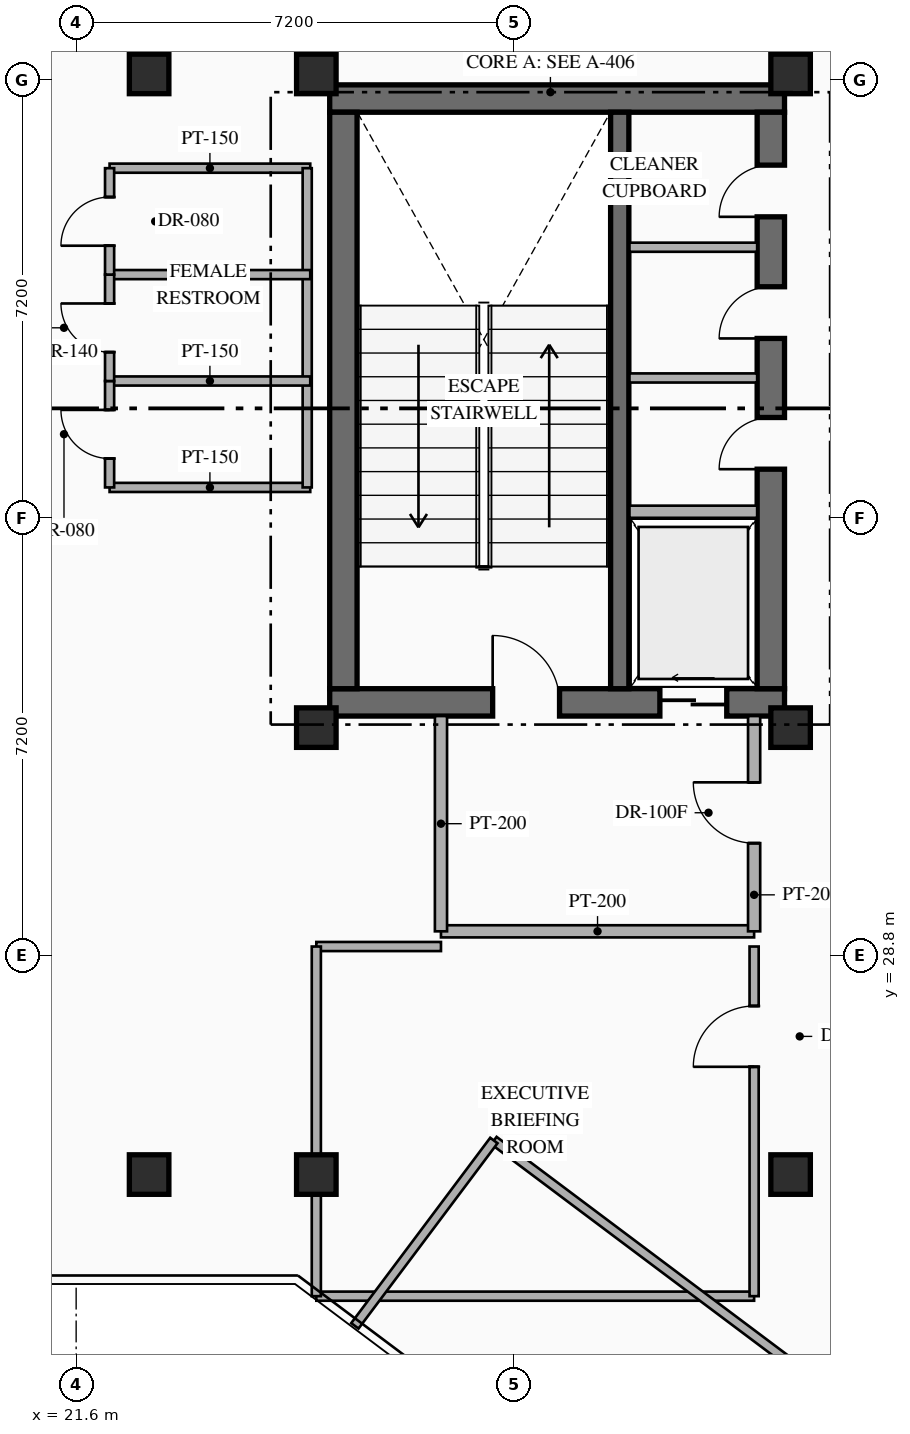
"""IFC4 building model, lengths in metres.
Left out: names, types, materials, properties, quantities, classifications, styles, units other than length and angle.
Written with IfcOpenShell. Run it as: python <this file> out.ifc"""

import sys

from ifc_helpers import new_model, si_unit, direction, frame, frame_2d, origin, origin_2d, place, context, subcontext, project, spatial, rectangle, hollow_rectangle, extrude, element, fill, save


model = new_model("IFC4")
c1 = context("Model", 3, precision=1e-05, world=origin(), true_north=direction((0.0, 1.0)))
c2 = subcontext(c1, "Body", "Model", "MODEL_VIEW")
j1 = project(units=[si_unit("LENGTHUNIT", "METRE"), si_unit("PLANEANGLEUNIT", "RADIAN")], contexts=[c1])
p1 = place(None, origin())
s1 = spatial("IfcSite", under=j1, at=p1, CompositionType="ELEMENT")
p2 = place(p1, origin())
s2 = spatial("IfcBuilding", under=s1, at=p2, CompositionType="ELEMENT")
p3 = place(p2, frame((0.0, 0.0, 261.75)))
s3 = spatial("IfcBuildingStorey", under=s2, at=p3, CompositionType="ELEMENT", Elevation=261.75)
p4 = place(p3, frame((25.77, 32.965, 0.0), z_axis=(0.0, 0.0, 1.0), x_axis=(1.0, 0.0, 0.0)))
e1 = element("IfcWall", 1, at=p4, inside=s3, PredefinedType="SHEAR", context=c2, shape_type="SweptSolid", body=[
    extrude(rectangle(XDim=7.48, YDim=0.45, at=frame_2d((3.74, 0.0))), origin(), (0.0, 0.0, 1.0), 4.2),
])
p5 = place(p4, frame((2.68, 0.0, 0.0)))
e2 = element("IfcOpeningElement", 2, at=p5, cuts=e1, PredefinedType="OPENING", context=c2, shape_type="SweptSolid", body=[
    extrude(rectangle(XDim=1.1, YDim=2.2, at=frame_2d((0.55, 1.1))), frame((0.0, 0.235, 0.0), z_axis=(0.0, -1.0, 0.0), x_axis=(1.0, 0.0, 0.0)), (0.0, 0.0, 1.0), 0.47),
])
p6 = place(p4, frame((5.43, 0.0, 0.0)))
e3 = element("IfcOpeningElement", 3, at=p6, cuts=e1, PredefinedType="OPENING", context=c2, shape_type="SweptSolid", body=[
    extrude(rectangle(XDim=1.1, YDim=2.15, at=frame_2d((0.55, 1.075))), frame((0.0, 0.235, 0.0), z_axis=(0.0, -1.0, 0.0), x_axis=(1.0, 0.0, 0.0)), (0.0, 0.0, 1.0), 0.47),
])
p7 = place(p3, frame((25.77, 42.895, 0.0), z_axis=(0.0, 0.0, 1.0), x_axis=(1.0, 0.0, 0.0)))
e4 = element("IfcWall", 4, at=p7, inside=s3, PredefinedType="SHEAR", context=c2, shape_type="SweptSolid", body=[
    extrude(rectangle(XDim=7.48, YDim=0.45, at=frame_2d((3.74, 0.0))), origin(), (0.0, 0.0, 1.0), 4.2),
])
p8 = place(p3, frame((25.995, 33.19, 0.0), z_axis=(0.0, 0.0, 1.0), x_axis=(0.0, 1.0, 0.0)))
e5 = element("IfcWall", 5, at=p8, inside=s3, PredefinedType="SHEAR", context=c2, shape_type="SweptSolid", body=[
    extrude(rectangle(XDim=9.48, YDim=0.45, at=frame_2d((4.74, 0.0))), origin(), (0.0, 0.0, 1.0), 4.2),
])
p9 = place(p3, frame((33.025, 33.19, 0.0), z_axis=(0.0, 0.0, 1.0), x_axis=(0.0, 1.0, 0.0)))
e6 = element("IfcWall", 6, at=p9, inside=s3, PredefinedType="SHEAR", context=c2, shape_type="SweptSolid", body=[
    extrude(rectangle(XDim=9.48, YDim=0.45, at=frame_2d((4.74, 0.0))), origin(), (0.0, 0.0, 1.0), 4.2),
])
p10 = place(p9, frame((3.61, 0.0, 0.0)))
e7 = element("IfcOpeningElement", 7, at=p10, cuts=e6, PredefinedType="OPENING", context=c2, shape_type="SweptSolid", body=[
    extrude(rectangle(XDim=0.85, YDim=2.08, at=frame_2d((0.425, 1.04))), frame((0.0, 0.235, 0.0), z_axis=(0.0, -1.0, 0.0), x_axis=(1.0, 0.0, 0.0)), (0.0, 0.0, 1.0), 0.47),
])
p11 = place(p9, frame((5.76, 0.0, 0.0)))
e8 = element("IfcOpeningElement", 8, at=p11, cuts=e6, PredefinedType="OPENING", context=c2, shape_type="SweptSolid", body=[
    extrude(rectangle(XDim=0.85, YDim=2.08, at=frame_2d((0.425, 1.04))), frame((0.0, 0.235, 0.0), z_axis=(0.0, -1.0, 0.0), x_axis=(1.0, 0.0, 0.0)), (0.0, 0.0, 1.0), 0.47),
])
p12 = place(p9, frame((7.76, 0.0, 0.0)))
e9 = element("IfcOpeningElement", 9, at=p12, cuts=e6, PredefinedType="OPENING", context=c2, shape_type="SweptSolid", body=[
    extrude(rectangle(XDim=0.85, YDim=2.08, at=frame_2d((0.425, 1.04))), frame((0.0, 0.235, 0.0), z_axis=(0.0, -1.0, 0.0), x_axis=(1.0, 0.0, 0.0)), (0.0, 0.0, 1.0), 0.47),
])
p13 = place(p3, frame((30.54, 33.19, 0.0), z_axis=(0.0, 0.0, 1.0), x_axis=(0.0, 1.0, 0.0)))
e10 = element("IfcWall", 10, at=p13, inside=s3, PredefinedType="SHEAR", context=c2, shape_type="SweptSolid", body=[
    extrude(rectangle(XDim=9.48, YDim=0.3, at=frame_2d((4.74, 0.0))), origin(), (0.0, 0.0, 1.0), 4.2),
])
for number, where, z_axis, x_axis in (
    (11, (25.55, 32.55, 0.0), (0.0, 0.0, 1.0), (1.0, 0.0, 0.0)),
    (12, (33.35, 32.55, 0.0), (0.0, 0.0, 1.0), (1.0, 0.0, 0.0)),
    (13, (25.55, 43.3, 0.0), (0.0, 0.0, 1.0), (1.0, 0.0, 0.0)),
    (14, (33.35, 43.3, 0.0), (0.0, 0.0, 1.0), (1.0, 0.0, 0.0)),
    (15, (25.55, 25.2, 0.0), (0.0, 0.0, 1.0), (1.0, 0.0, 0.0)),
    (16, (33.35, 25.2, 0.0), (0.0, 0.0, 1.0), (1.0, 0.0, 0.0)),
    (17, (22.8, 25.2, 0.0), (0.0, 0.0, 1.0), (1.0, 0.0, 0.0)),
    (18, (22.8, 43.3, 0.0), (0.0, 0.0, 1.0), (1.0, 0.0, 0.0)),
):
    element("IfcColumn", number, at=place(p3, frame(where, z_axis=z_axis, x_axis=x_axis)), inside=s3, PredefinedType="COLUMN", context=c2, shape_type="SweptSolid", body=[
        extrude(hollow_rectangle(XDim=0.65, YDim=0.65, WallThickness=0.025, at=origin_2d()), origin(), (0.0, 0.0, 1.0), 4.2),
    ])
p14 = place(p3, frame((30.7, 36.1, 0.0), z_axis=(0.0, 0.0, 1.0), x_axis=(1.0, 0.0, 0.0)))
e19 = element("IfcWall", 19, at=p14, inside=s3, PredefinedType="STANDARD", context=c2, shape_type="SweptSolid", body=[
    extrude(rectangle(XDim=2.1, YDim=0.2, at=frame_2d((1.05, 0.0))), origin(), (0.0, 0.0, 1.0), 3.94),
])
for number, where, z_axis, x_axis in (
    (20, (30.7, 38.3, 0.0), (0.0, 0.0, 1.0), (1.0, 0.0, 0.0)),
    (21, (30.7, 40.45, 0.0), (0.0, 0.0, 1.0), (1.0, 0.0, 0.0)),
):
    element("IfcWall", number, at=place(p3, frame(where, z_axis=z_axis, x_axis=x_axis)), inside=s3, PredefinedType="PARTITIONING", context=c2, shape_type="SweptSolid", body=[
        extrude(rectangle(XDim=2.1, YDim=0.15, at=frame_2d((1.05, 0.0))), origin(), (0.0, 0.0, 1.0), 3.94),
    ])
p15 = place(p3, frame((27.6, 29.2, 0.0), z_axis=(0.0, 0.0, 1.0), x_axis=(1.0, 0.0, 0.0)))
e22 = element("IfcWall", 22, at=p15, inside=s3, PredefinedType="STANDARD", context=c2, shape_type="SweptSolid", body=[
    extrude(rectangle(XDim=5.15, YDim=0.2, at=frame_2d((2.575, 0.0))), origin(), (0.0, 0.0, 1.0), 3.94),
])
p16 = place(p3, frame((27.6, 29.2, 0.0), z_axis=(0.0, 0.0, 1.0), x_axis=(0.0, 1.0, 0.0)))
e23 = element("IfcWall", 23, at=p16, inside=s3, PredefinedType="STANDARD", context=c2, shape_type="SweptSolid", body=[
    extrude(rectangle(XDim=3.54, YDim=0.2, at=frame_2d((1.77, 0.0))), origin(), (0.0, 0.0, 1.0), 3.94),
])
p17 = place(p3, frame((32.75, 29.2, 0.0), z_axis=(0.0, 0.0, 1.0), x_axis=(0.0, 1.0, 0.0)))
e24 = element("IfcWall", 24, at=p17, inside=s3, PredefinedType="STANDARD", context=c2, shape_type="SweptSolid", body=[
    extrude(rectangle(XDim=3.54, YDim=0.2, at=frame_2d((1.77, 0.0))), origin(), (0.0, 0.0, 1.0), 3.94),
])
p18 = place(p17, frame((1.45, 0.0, 0.0)))
e25 = element("IfcOpeningElement", 25, at=p18, cuts=e24, PredefinedType="OPENING", context=c2, shape_type="SweptSolid", body=[
    extrude(rectangle(XDim=1.0, YDim=2.2, at=frame_2d((0.5, 1.1))), frame((0.0, 0.11, 0.0), z_axis=(0.0, -1.0, 0.0), x_axis=(1.0, 0.0, 0.0)), (0.0, 0.0, 1.0), 0.22),
])
for number, where, z_axis, x_axis in (
    (26, (22.15, 36.5, 0.0), (0.0, 0.0, 1.0), (1.0, 0.0, 0.0)),
    (27, (22.15, 41.75, 0.0), (0.0, 0.0, 1.0), (1.0, 0.0, 0.0)),
):
    element("IfcWall", number, at=place(p3, frame(where, z_axis=z_axis, x_axis=x_axis)), inside=s3, PredefinedType="PARTITIONING", context=c2, shape_type="SweptSolid", body=[
        extrude(rectangle(XDim=3.3, YDim=0.15, at=frame_2d((1.65, 0.0))), origin(), (0.0, 0.0, 1.0), 3.94),
    ])
p19 = place(p3, frame((25.4, 36.5, 0.0), z_axis=(0.0, 0.0, 1.0), x_axis=(0.0, 1.0, 0.0)))
e28 = element("IfcWall", 28, at=p19, inside=s3, PredefinedType="PARTITIONING", context=c2, shape_type="SweptSolid", body=[
    extrude(rectangle(XDim=5.25, YDim=0.15, at=frame_2d((2.625, 0.0))), origin(), (0.0, 0.0, 1.0), 3.94),
])
for number, where, z_axis, x_axis in (
    (29, (22.15, 38.25, 0.0), (0.0, 0.0, 1.0), (1.0, 0.0, 0.0)),
    (30, (22.15, 40.0, 0.0), (0.0, 0.0, 1.0), (1.0, 0.0, 0.0)),
):
    element("IfcWall", number, at=place(p3, frame(where, z_axis=z_axis, x_axis=x_axis)), inside=s3, PredefinedType="PARTITIONING", context=c2, shape_type="SweptSolid", body=[
        extrude(rectangle(XDim=3.3, YDim=0.15, at=frame_2d((1.65, 0.0))), origin(), (0.0, 0.0, 1.0), 3.94),
    ])
p20 = place(p3, frame((22.15, 36.5, 0.0), z_axis=(0.0, 0.0, 1.0), x_axis=(0.0, 1.0, 0.0)))
e31 = element("IfcWall", 31, at=p20, inside=s3, PredefinedType="PARTITIONING", context=c2, shape_type="SweptSolid", body=[
    extrude(rectangle(XDim=1.75, YDim=0.15, at=frame_2d((0.875, 0.0))), origin(), (0.0, 0.0, 1.0), 3.94),
])
p21 = place(p20, frame((0.475, 0.0, 0.0)))
e32 = element("IfcOpeningElement", 32, at=p21, cuts=e31, PredefinedType="OPENING", context=c2, shape_type="SweptSolid", body=[
    extrude(rectangle(XDim=0.8, YDim=2.06, at=frame_2d((0.4, 1.03))), frame((0.0, 0.085, 0.0), z_axis=(0.0, -1.0, 0.0), x_axis=(1.0, 0.0, 0.0)), (0.0, 0.0, 1.0), 0.17),
])
p22 = place(p3, frame((22.15, 38.25, 0.0), z_axis=(0.0, 0.0, 1.0), x_axis=(0.0, 1.0, 0.0)))
e33 = element("IfcWall", 33, at=p22, inside=s3, PredefinedType="PARTITIONING", context=c2, shape_type="SweptSolid", body=[
    extrude(rectangle(XDim=1.75, YDim=0.15, at=frame_2d((0.875, 0.0))), origin(), (0.0, 0.0, 1.0), 3.94),
])
p23 = place(p22, frame((0.475, 0.0, 0.0)))
e34 = element("IfcOpeningElement", 34, at=p23, cuts=e33, PredefinedType="OPENING", context=c2, shape_type="SweptSolid", body=[
    extrude(rectangle(XDim=0.8, YDim=2.06, at=frame_2d((0.4, 1.03))), frame((0.0, 0.085, 0.0), z_axis=(0.0, -1.0, 0.0), x_axis=(1.0, 0.0, 0.0)), (0.0, 0.0, 1.0), 0.17),
])
p24 = place(p3, frame((22.15, 40.0, 0.0), z_axis=(0.0, 0.0, 1.0), x_axis=(0.0, 1.0, 0.0)))
e35 = element("IfcWall", 35, at=p24, inside=s3, PredefinedType="PARTITIONING", context=c2, shape_type="SweptSolid", body=[
    extrude(rectangle(XDim=1.75, YDim=0.15, at=frame_2d((0.875, 0.0))), origin(), (0.0, 0.0, 1.0), 3.94),
])
p25 = place(p24, frame((0.475, 0.0, 0.0)))
e36 = element("IfcOpeningElement", 36, at=p25, cuts=e35, PredefinedType="OPENING", context=c2, shape_type="SweptSolid", body=[
    extrude(rectangle(XDim=0.8, YDim=2.06, at=frame_2d((0.4, 1.03))), frame((0.0, 0.085, 0.0), z_axis=(0.0, -1.0, 0.0), x_axis=(1.0, 0.0, 0.0)), (0.0, 0.0, 1.0), 0.17),
])
p26 = place(p3, frame((25.55, 23.2, 0.0), z_axis=(0.0, 0.0, 1.0), x_axis=(1.0, 0.0, 0.0)))
e37 = element("IfcWall", 37, at=p26, inside=s3, PredefinedType="PARTITIONING", context=c2, shape_type="SweptSolid", body=[
    extrude(rectangle(XDim=7.2, YDim=0.15, at=frame_2d((3.6, 0.0))), origin(), (0.0, 0.0, 1.0), 3.94),
])
p27 = place(p3, frame((25.55, 28.95, 0.0), z_axis=(0.0, 0.0, 1.0), x_axis=(1.0, 0.0, 0.0)))
e38 = element("IfcWall", 38, at=p27, inside=s3, PredefinedType="PARTITIONING", context=c2, shape_type="SweptSolid", body=[
    extrude(rectangle(XDim=2.05, YDim=0.15, at=frame_2d((1.025, 0.0))), origin(), (0.0, 0.0, 1.0), 3.94),
])
p28 = place(p3, frame((25.55, 23.2, 0.0), z_axis=(0.0, 0.0, 1.0), x_axis=(0.0, 1.0, 0.0)))
e39 = element("IfcWall", 39, at=p28, inside=s3, PredefinedType="PARTITIONING", context=c2, shape_type="SweptSolid", body=[
    extrude(rectangle(XDim=5.75, YDim=0.15, at=frame_2d((2.875, 0.0))), origin(), (0.0, 0.0, 1.0), 2.445),
])
p29 = place(p3, frame((32.75, 23.2, 0.0), z_axis=(0.0, 0.0, 1.0), x_axis=(0.0, 1.0, 0.0)))
e40 = element("IfcWall", 40, at=p29, inside=s3, PredefinedType="PARTITIONING", context=c2, shape_type="SweptSolid", body=[
    extrude(rectangle(XDim=5.75, YDim=0.15, at=frame_2d((2.875, 0.0))), origin(), (0.0, 0.0, 1.0), 3.94),
])
p30 = place(p29, frame((3.772, 0.0, 0.0)))
e41 = element("IfcOpeningElement", 41, at=p30, cuts=e40, PredefinedType="OPENING", context=c2, shape_type="SweptSolid", body=[
    extrude(rectangle(XDim=1.0, YDim=2.15, at=frame_2d((0.5, 1.075))), frame((0.0, 0.085, 0.0), z_axis=(0.0, -1.0, 0.0), x_axis=(1.0, 0.0, 0.0)), (0.0, 0.0, 1.0), 0.17),
])
p31 = place(p3, frame((28.47, 25.76, 0.0), z_axis=(0.0, 0.0, 1.0), x_axis=(0.800001748029, -0.599997669287, 0.0)))
e42 = element("IfcWall", 42, at=p31, inside=s3, PredefinedType="PARTITIONING", context=c2, shape_type="SweptSolid", body=[
    extrude(rectangle(XDim=16.76, YDim=0.15, at=frame_2d((8.38, 0.0))), origin(), (0.0, 0.0, 1.0), 3.94),
])
p32 = place(p31, frame((7.905, 0.0, 0.0)))
e43 = element("IfcOpeningElement", 43, at=p32, cuts=e42, PredefinedType="OPENING", context=c2, shape_type="SweptSolid", body=[
    extrude(rectangle(XDim=0.95, YDim=2.15, at=frame_2d((0.475, 1.075))), frame((0.0, 0.085, 0.0), z_axis=(0.0, -1.0, 0.0), x_axis=(1.0, 0.0, 0.0)), (0.0, 0.0, 1.0), 0.17),
])
p33 = place(p3, frame((26.184, 22.712, 0.0), z_axis=(0.0, 0.0, 1.0), x_axis=(0.599969241761, 0.800023067755, 0.0)))
e44 = element("IfcWall", 44, at=p33, inside=s3, PredefinedType="PARTITIONING", context=c2, shape_type="SweptSolid", body=[
    extrude(rectangle(XDim=3.81, YDim=0.15, at=frame_2d((1.905, 0.0))), origin(), (0.0, 0.0, 1.0), 3.94),
])
p34 = place(p5, origin())
e45 = element("IfcDoor", 45, at=p34, inside=s3, OperationType="SINGLE_SWING_LEFT", PredefinedType="DOOR", context=c2, shape_type="SweptSolid", body=[
    extrude(rectangle(XDim=1.1, YDim=2.2, at=frame_2d((0.55, 1.1))), frame((0.0, 0.025, 0.0), z_axis=(0.0, -1.0, 0.0), x_axis=(1.0, 0.0, 0.0)), (0.0, 0.0, 1.0), 0.05),
])
fill(e2, e45)
p35 = place(p6, origin())
e46 = element("IfcDoor", 46, at=p35, inside=s3, OperationType="SLIDING_TO_LEFT", PredefinedType="USERDEFINED", context=c2, shape_type="SweptSolid", body=[
    extrude(rectangle(XDim=1.1, YDim=2.15, at=frame_2d((0.55, 1.075))), frame((0.0, 0.025, 0.0), z_axis=(0.0, -1.0, 0.0), x_axis=(1.0, 0.0, 0.0)), (0.0, 0.0, 1.0), 0.05),
])
fill(e3, e46)
p36 = place(p10, origin())
e47 = element("IfcDoor", 47, at=p36, inside=s3, OperationType="SINGLE_SWING_LEFT", PredefinedType="DOOR", context=c2, shape_type="SweptSolid", body=[
    extrude(rectangle(XDim=0.85, YDim=2.08, at=frame_2d((0.425, 1.04))), frame((0.0, 0.025, 0.0), z_axis=(0.0, -1.0, 0.0), x_axis=(1.0, 0.0, 0.0)), (0.0, 0.0, 1.0), 0.05),
])
fill(e7, e47)
p37 = place(p11, origin())
e48 = element("IfcDoor", 48, at=p37, inside=s3, OperationType="SINGLE_SWING_LEFT", PredefinedType="DOOR", context=c2, shape_type="SweptSolid", body=[
    extrude(rectangle(XDim=0.85, YDim=2.08, at=frame_2d((0.425, 1.04))), frame((0.0, 0.025, 0.0), z_axis=(0.0, -1.0, 0.0), x_axis=(1.0, 0.0, 0.0)), (0.0, 0.0, 1.0), 0.05),
])
fill(e8, e48)
p38 = place(p12, origin())
e49 = element("IfcDoor", 49, at=p38, inside=s3, OperationType="SINGLE_SWING_LEFT", PredefinedType="DOOR", context=c2, shape_type="SweptSolid", body=[
    extrude(rectangle(XDim=0.85, YDim=2.08, at=frame_2d((0.425, 1.04))), frame((0.0, 0.025, 0.0), z_axis=(0.0, -1.0, 0.0), x_axis=(1.0, 0.0, 0.0)), (0.0, 0.0, 1.0), 0.05),
])
fill(e9, e49)
p39 = place(p18, origin())
e50 = element("IfcDoor", 50, at=p39, inside=s3, OperationType="SINGLE_SWING_RIGHT", PredefinedType="DOOR", context=c2, shape_type="SweptSolid", body=[
    extrude(rectangle(XDim=1.0, YDim=2.2, at=frame_2d((0.5, 1.1))), frame((0.0, 0.025, 0.0), z_axis=(0.0, -1.0, 0.0), x_axis=(1.0, 0.0, 0.0)), (0.0, 0.0, 1.0), 0.05),
])
fill(e25, e50)
p40 = place(p21, origin())
e51 = element("IfcDoor", 51, at=p40, inside=s3, OperationType="SINGLE_SWING_RIGHT", PredefinedType="DOOR", context=c2, shape_type="SweptSolid", body=[
    extrude(rectangle(XDim=0.8, YDim=2.06, at=frame_2d((0.4, 1.03))), frame((0.0, 0.025, 0.0), z_axis=(0.0, -1.0, 0.0), x_axis=(1.0, 0.0, 0.0)), (0.0, 0.0, 1.0), 0.05),
])
fill(e32, e51)
p41 = place(p23, origin())
e52 = element("IfcDoor", 52, at=p41, inside=s3, OperationType="SINGLE_SWING_RIGHT", PredefinedType="DOOR", context=c2, shape_type="SweptSolid", body=[
    extrude(rectangle(XDim=0.8, YDim=2.06, at=frame_2d((0.4, 1.03))), frame((0.0, 0.025, 0.0), z_axis=(0.0, -1.0, 0.0), x_axis=(1.0, 0.0, 0.0)), (0.0, 0.0, 1.0), 0.05),
])
fill(e34, e52)
p42 = place(p25, origin())
e53 = element("IfcDoor", 53, at=p42, inside=s3, OperationType="SINGLE_SWING_LEFT", PredefinedType="DOOR", context=c2, shape_type="SweptSolid", body=[
    extrude(rectangle(XDim=0.8, YDim=2.06, at=frame_2d((0.4, 1.03))), frame((0.0, 0.025, 0.0), z_axis=(0.0, -1.0, 0.0), x_axis=(1.0, 0.0, 0.0)), (0.0, 0.0, 1.0), 0.05),
])
fill(e36, e53)
p43 = place(p30, origin())
e54 = element("IfcDoor", 54, at=p43, inside=s3, OperationType="SINGLE_SWING_LEFT", PredefinedType="DOOR", context=c2, shape_type="SweptSolid", body=[
    extrude(rectangle(XDim=1.0, YDim=2.15, at=frame_2d((0.5, 1.075))), frame((0.0, 0.025, 0.0), z_axis=(0.0, -1.0, 0.0), x_axis=(1.0, 0.0, 0.0)), (0.0, 0.0, 1.0), 0.05),
])
fill(e41, e54)
save(model, sys.argv[1])
